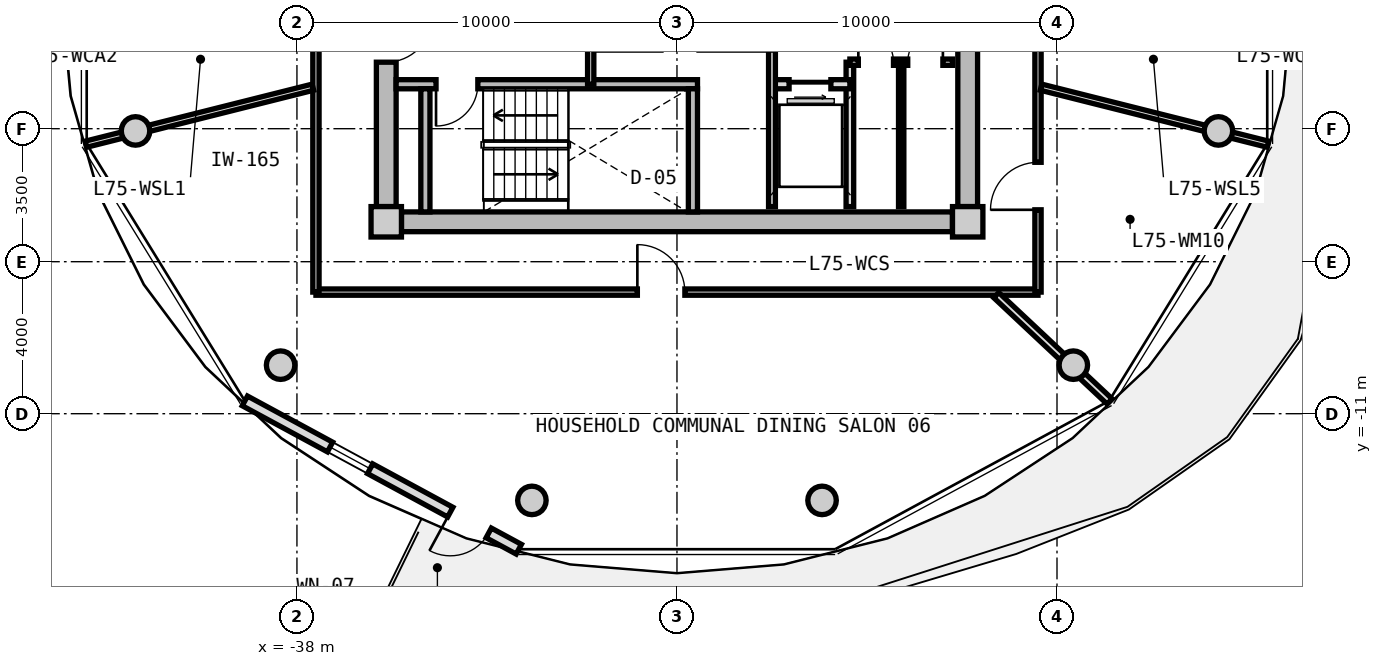
"""IFC4 building model, lengths in metres.
Left out: names, types, materials, properties, quantities, classifications, styles, units other than length and angle.
Written with IfcOpenShell. Run it as: python <this file> out.ifc"""

import sys

from ifc_helpers import new_model, si_unit, direction, frame, frame_2d, origin, origin_2d, place, context, subcontext, project, spatial, rectangle, circle, extrude, source, transform, mapped, element, fill, save


model = new_model("IFC4")
c1 = context("Model", 3, precision=1e-05, world=origin(), true_north=direction((0.0, 1.0)))
c2 = subcontext(c1, "Body", "Model", "MODEL_VIEW")
j1 = project(units=[si_unit("LENGTHUNIT", "METRE"), si_unit("PLANEANGLEUNIT", "RADIAN")], contexts=[c1])
p1 = place(None, origin())
s1 = spatial("IfcSite", under=j1, at=p1, CompositionType="ELEMENT")
p2 = place(p1, origin())
s2 = spatial("IfcBuilding", under=s1, at=p2, CompositionType="ELEMENT")
p3 = place(p2, frame((0.0, 0.0, 241.35)))
s3 = spatial("IfcBuildingStorey", under=s2, at=p3, CompositionType="ELEMENT", Elevation=241.35)
m1 = source(origin(), c2, "Body", "SweptSolid", [
    extrude(rectangle(XDim=0.8, YDim=0.8, at=origin_2d()), origin(), (0.0, 0.0, 1.0), 3.05),
])
for number, where, z_axis, x_axis in (
    (1, (-35.65, -5.95, 0.0), (0.0, 0.0, 1.0), (1.0, 0.0, 0.0)),
    (2, (-20.35, -5.95, 0.0), (0.0, 0.0, 1.0), (1.0, 0.0, 0.0)),
):
    element("IfcColumn", number, at=place(p3, frame(where, z_axis=z_axis, x_axis=x_axis)), inside=s3, PredefinedType="COLUMN", context=c2, shape_type="MappedRepresentation", body=[
        mapped(m1, transform((0.0, 0.0, 0.0), x_axis=(1.0, 0.0, 0.0), y_axis=(0.0, 1.0, 0.0), z_axis=(0.0, 0.0, 1.0), scale=1.0)),
    ])
m2 = source(origin(), c2, "Body", "SweptSolid", [
    extrude(rectangle(XDim=14.5, YDim=0.52, at=frame_2d((7.25, 0.0))), origin(), (0.0, 0.0, 1.0), 2.73),
])
p4 = place(p3, frame((-20.75, -5.95, 0.0), z_axis=(0.0, 0.0, 1.0), x_axis=(-1.0, 0.0, 0.0)))
e3 = element("IfcWall", 3, at=p4, inside=s3, PredefinedType="SHEAR", context=c2, shape_type="MappedRepresentation", body=[
    mapped(m2, transform((0.0, 0.0, 0.0), x_axis=(1.0, 0.0, 0.0), y_axis=(0.0, 1.0, 0.0), z_axis=(0.0, 0.0, 1.0), scale=1.0)),
])
m3 = source(origin(), c2, "Body", "SweptSolid", [
    extrude(rectangle(XDim=11.1, YDim=0.52, at=frame_2d((5.55, 0.0))), origin(), (0.0, 0.0, 1.0), 2.73),
])
p5 = place(p3, frame((-35.65, -5.55, 0.0), z_axis=(0.0, 0.0, 1.0), x_axis=(0.0, 1.0, 0.0)))
e4 = element("IfcWall", 4, at=p5, inside=s3, PredefinedType="SHEAR", context=c2, shape_type="MappedRepresentation", body=[
    mapped(m3, transform((0.0, 0.0, 0.0), x_axis=(1.0, 0.0, 0.0), y_axis=(0.0, 1.0, 0.0), z_axis=(0.0, 0.0, 1.0), scale=1.0)),
])
p6 = place(p5, frame((3.8, 0.0, 0.0)))
e5 = element("IfcOpeningElement", 5, at=p6, cuts=e4, PredefinedType="OPENING", context=c2, shape_type="SweptSolid", body=[
    extrude(rectangle(XDim=1.2, YDim=2.15, at=frame_2d((0.6, 1.075))), frame((0.0, 0.27, 0.0), z_axis=(0.0, -1.0, 0.0), x_axis=(1.0, 0.0, 0.0)), (0.0, 0.0, 1.0), 0.54),
])
p7 = place(p3, frame((-20.35, 5.55, 0.0), z_axis=(0.0, 0.0, 1.0), x_axis=(0.0, -1.0, 0.0)))
e6 = element("IfcWall", 6, at=p7, inside=s3, PredefinedType="SHEAR", context=c2, shape_type="MappedRepresentation", body=[
    mapped(m3, transform((0.0, 0.0, 0.0), x_axis=(1.0, 0.0, 0.0), y_axis=(0.0, 1.0, 0.0), z_axis=(0.0, 0.0, 1.0), scale=1.0)),
])
p8 = place(p7, frame((5.65, 0.0, 0.0)))
e7 = element("IfcOpeningElement", 7, at=p8, cuts=e6, PredefinedType="OPENING", context=c2, shape_type="SweptSolid", body=[
    extrude(rectangle(XDim=1.2, YDim=2.15, at=frame_2d((0.6, 1.075))), frame((0.0, 0.27, 0.0), z_axis=(0.0, -1.0, 0.0), x_axis=(1.0, 0.0, 0.0)), (0.0, 0.0, 1.0), 0.54),
])
m4 = source(origin(), c2, "Body", "SweptSolid", [
    extrude(circle(Radius=0.375, at=origin_2d()), origin(), (0.0, 0.0, 1.0), 3.05),
])
for number, where, z_axis, x_axis in (
    (8, (-42.247, -3.559, 0.0), (0.0, 0.0, 1.0), (1.0, 0.0, 0.0)),
    (9, (-38.43, -9.723, 0.0), (0.0, 0.0, 1.0), (1.0, 0.0, 0.0)),
    (10, (-31.818, -13.281, 0.0), (0.0, 0.0, 1.0), (1.0, 0.0, 0.0)),
    (11, (-24.182, -13.281, 0.0), (0.0, 0.0, 1.0), (1.0, 0.0, 0.0)),
    (12, (-17.57, -9.723, 0.0), (0.0, 0.0, 1.0), (1.0, 0.0, 0.0)),
    (13, (-13.753, -3.559, 0.0), (0.0, 0.0, 1.0), (1.0, 0.0, 0.0)),
):
    element("IfcColumn", number, at=place(p3, frame(where, z_axis=z_axis, x_axis=x_axis)), inside=s3, PredefinedType="COLUMN", context=c2, shape_type="MappedRepresentation", body=[
        mapped(m4, transform((0.0, 0.0, 0.0), x_axis=(1.0, 0.0, 0.0), y_axis=(0.0, 1.0, 0.0), z_axis=(0.0, 0.0, 1.0), scale=1.0)),
    ])
m5 = source(origin(), c2, "Body", "SweptSolid", [
    extrude(rectangle(XDim=8.197, YDim=0.29, at=frame_2d((4.099, 0.0))), origin(), (0.0, 0.0, 1.0), 2.73),
])
p9 = place(p3, frame((-32.162, -14.566, 0.0), z_axis=(0.0, 0.0, 1.0), x_axis=(-0.879369910001, 0.476139224791, 0.0)))
e14 = element("IfcWall", 14, at=p9, inside=s3, PredefinedType="SOLIDWALL", context=c2, shape_type="MappedRepresentation", body=[
    mapped(m5, transform((0.0, 0.0, 0.0), x_axis=(1.0, 0.0, 0.0), y_axis=(0.0, 1.0, 0.0), z_axis=(0.0, 0.0, 1.0), scale=1.0)),
])
p10 = place(p9, frame((0.9, 0.0, 0.0)))
e15 = element("IfcOpeningElement", 15, at=p10, cuts=e14, PredefinedType="OPENING", context=c2, shape_type="SweptSolid", body=[
    extrude(rectangle(XDim=1.15, YDim=2.25, at=frame_2d((0.575, 1.125))), frame((0.0, 0.155, 0.0), z_axis=(0.0, -1.0, 0.0), x_axis=(1.0, 0.0, 0.0)), (0.0, 0.0, 1.0), 0.31),
])
p11 = place(p9, frame((4.448, 0.0, 0.85)))
e16 = element("IfcOpeningElement", 16, at=p11, cuts=e14, PredefinedType="OPENING", context=c2, shape_type="SweptSolid", body=[
    extrude(rectangle(XDim=1.2, YDim=1.5, at=frame_2d((0.6, 0.75))), frame((0.0, 0.155, 0.0), z_axis=(0.0, -1.0, 0.0), x_axis=(1.0, 0.0, 0.0)), (0.0, 0.0, 1.0), 0.31),
])
m6 = source(origin(), c2, "Body", "SweptSolid", [
    extrude(rectangle(XDim=7.93, YDim=0.24, at=frame_2d((3.965, 0.0))), origin(), (0.0, 0.0, 1.0), 2.73),
])
p12 = place(p3, frame((-35.39, -2.33, 0.0), z_axis=(0.0, 0.0, 1.0), x_axis=(1.0, 0.0, 0.0)))
e17 = element("IfcWall", 17, at=p12, inside=s3, PredefinedType="PARTITIONING", context=c2, shape_type="MappedRepresentation", body=[
    mapped(m6, transform((0.0, 0.0, 0.0), x_axis=(1.0, 0.0, 0.0), y_axis=(0.0, 1.0, 0.0), z_axis=(0.0, 0.0, 1.0), scale=1.0)),
])
p13 = place(p12, frame((1.05, 0.0, 0.0)))
e18 = element("IfcOpeningElement", 18, at=p13, cuts=e17, PredefinedType="OPENING", context=c2, shape_type="SweptSolid", body=[
    extrude(rectangle(XDim=1.1, YDim=2.15, at=frame_2d((0.55, 1.075))), frame((0.0, 0.13, 0.0), z_axis=(0.0, -1.0, 0.0), x_axis=(1.0, 0.0, 0.0)), (0.0, 0.0, 1.0), 0.26),
])
m7 = source(origin(), c2, "Body", "SweptSolid", [
    extrude(rectangle(XDim=3.24, YDim=0.24, at=frame_2d((1.62, 0.0))), origin(), (0.0, 0.0, 1.0), 2.73),
])
for number, where, z_axis, x_axis in (
    (19, (-34.62, -5.69, 0.0), (0.0, 0.0, 1.0), (0.0, 1.0, 0.0)),
    (20, (-27.58, -5.69, 0.0), (0.0, 0.0, 1.0), (0.0, 1.0, 0.0)),
):
    element("IfcWall", number, at=place(p3, frame(where, z_axis=z_axis, x_axis=x_axis)), inside=s3, PredefinedType="PARTITIONING", context=c2, shape_type="MappedRepresentation", body=[
        mapped(m7, transform((0.0, 0.0, 0.0), x_axis=(1.0, 0.0, 0.0), y_axis=(0.0, 1.0, 0.0), z_axis=(0.0, 0.0, 1.0), scale=1.0)),
    ])
m8 = source(origin(), c2, "Body", "SweptSolid", [
    extrude(rectangle(XDim=3.8, YDim=0.2, at=frame_2d((1.9, 0.0))), origin(), (0.0, 0.0, 1.0), 2.715),
])
p14 = place(p3, frame((-23.45, -5.55, 0.0), z_axis=(0.0, 0.0, 1.0), x_axis=(0.0, 1.0, 0.0)))
e21 = element("IfcWall", 21, at=p14, inside=s3, PredefinedType="PARTITIONING", context=c2, shape_type="MappedRepresentation", body=[
    mapped(m8, transform((0.0, 0.0, 0.0), x_axis=(1.0, 0.0, 0.0), y_axis=(0.0, 1.0, 0.0), z_axis=(0.0, 0.0, 1.0), scale=1.0)),
])
m9 = source(origin(), c2, "Body", "SweptSolid", [
    extrude(rectangle(XDim=2.05, YDim=0.24, at=frame_2d((1.025, 0.0))), origin(), (0.0, 0.0, 1.0), 2.715),
])
p15 = place(p3, frame((-25.5, -2.33, 0.0), z_axis=(0.0, 0.0, 1.0), x_axis=(1.0, 0.0, 0.0)))
e22 = element("IfcWall", 22, at=p15, inside=s3, PredefinedType="PARTITIONING", context=c2, shape_type="MappedRepresentation", body=[
    mapped(m9, transform((0.0, 0.0, 0.0), x_axis=(1.0, 0.0, 0.0), y_axis=(0.0, 1.0, 0.0), z_axis=(0.0, 0.0, 1.0), scale=1.0)),
])
p16 = place(p15, frame((0.45, 0.0, 0.0)))
e23 = element("IfcOpeningElement", 23, at=p16, cuts=e22, PredefinedType="OPENING", context=c2, shape_type="SweptSolid", body=[
    extrude(rectangle(XDim=1.1, YDim=2.2, at=frame_2d((0.55, 1.1))), frame((0.0, 0.13, 0.0), z_axis=(0.0, -1.0, 0.0), x_axis=(1.0, 0.0, 0.0)), (0.0, 0.0, 1.0), 0.26),
])
m10 = source(origin(), c2, "Body", "SweptSolid", [
    extrude(rectangle(XDim=4.2, YDim=0.18, at=frame_2d((2.1, 0.0))), origin(), (0.0, 0.0, 1.0), 2.715),
])
p17 = place(p3, frame((-25.5, -5.55, 0.0), z_axis=(0.0, 0.0, 1.0), x_axis=(0.0, 1.0, 0.0)))
e24 = element("IfcWall", 24, at=p17, inside=s3, PredefinedType="PARTITIONING", context=c2, shape_type="MappedRepresentation", body=[
    mapped(m10, transform((0.0, 0.0, 0.0), x_axis=(1.0, 0.0, 0.0), y_axis=(0.0, 1.0, 0.0), z_axis=(0.0, 0.0, 1.0), scale=1.0)),
])
m11 = source(origin(), c2, "Body", "SweptSolid", [
    extrude(rectangle(XDim=0.98, YDim=0.165, at=frame_2d((0.49, 0.0))), origin(), (0.0, 0.0, 1.0), 2.715),
])
p18 = place(p3, frame((-30.27, -2.33, 0.0), z_axis=(0.0, 0.0, 1.0), x_axis=(0.0, 1.0, 0.0)))
e25 = element("IfcWall", 25, at=p18, inside=s3, PredefinedType="PARTITIONING", context=c2, shape_type="MappedRepresentation", body=[
    mapped(m11, transform((0.0, 0.0, 0.0), x_axis=(1.0, 0.0, 0.0), y_axis=(0.0, 1.0, 0.0), z_axis=(0.0, 0.0, 1.0), scale=1.0)),
])
m12 = source(origin(), c2, "Body", "SweptSolid", [
    extrude(rectangle(XDim=2.7, YDim=0.165, at=frame_2d((1.35, 0.0))), origin(), (0.0, 0.0, 1.0), 2.715),
])
p19 = place(p3, frame((-23.45, -1.75, 0.0), z_axis=(0.0, 0.0, 1.0), x_axis=(1.0, 0.0, 0.0)))
e26 = element("IfcWall", 26, at=p19, inside=s3, PredefinedType="PARTITIONING", context=c2, shape_type="MappedRepresentation", body=[
    mapped(m12, transform((0.0, 0.0, 0.0), x_axis=(1.0, 0.0, 0.0), y_axis=(0.0, 1.0, 0.0), z_axis=(0.0, 0.0, 1.0), scale=1.0)),
])
p20 = place(p19, frame((0.222, 0.0, 0.0)))
e27 = element("IfcOpeningElement", 27, at=p20, cuts=e26, PredefinedType="OPENING", context=c2, shape_type="SweptSolid", body=[
    extrude(rectangle(XDim=0.925, YDim=2.1, at=frame_2d((0.462, 1.05))), frame((0.0, 0.093, 0.0), z_axis=(0.0, -1.0, 0.0), x_axis=(1.0, 0.0, 0.0)), (0.0, 0.0, 1.0), 0.185),
])
p21 = place(p19, frame((1.522, 0.0, 0.0)))
e28 = element("IfcOpeningElement", 28, at=p21, cuts=e26, PredefinedType="OPENING", context=c2, shape_type="SweptSolid", body=[
    extrude(rectangle(XDim=0.925, YDim=2.1, at=frame_2d((0.462, 1.05))), frame((0.0, 0.093, 0.0), z_axis=(0.0, -1.0, 0.0), x_axis=(1.0, 0.0, 0.0)), (0.0, 0.0, 1.0), 0.185),
])
m13 = source(origin(), c2, "Body", "SweptSolid", [
    extrude(rectangle(XDim=3.8, YDim=0.14, at=frame_2d((1.9, 0.0))), origin(), (0.0, 0.0, 1.0), 2.715),
])
p22 = place(p3, frame((-22.1, -5.55, 0.0), z_axis=(0.0, 0.0, 1.0), x_axis=(0.0, 1.0, 0.0)))
e29 = element("IfcWall", 29, at=p22, inside=s3, PredefinedType="PARTITIONING", context=c2, shape_type="MappedRepresentation", body=[
    mapped(m13, transform((0.0, 0.0, 0.0), x_axis=(1.0, 0.0, 0.0), y_axis=(0.0, 1.0, 0.0), z_axis=(0.0, 0.0, 1.0), scale=1.0)),
])
m14 = source(origin(), c2, "Body", "SweptSolid", [
    extrude(rectangle(XDim=19.0, YDim=0.165, at=frame_2d((9.5, 0.0))), origin(), (0.0, 0.0, 1.0), 2.715),
])
p23 = place(p3, frame((-18.5, -7.8, 0.0), z_axis=(0.0, 0.0, 1.0), x_axis=(-1.0, 0.0, 0.0)))
e30 = element("IfcWall", 30, at=p23, inside=s3, PredefinedType="PARTITIONING", context=c2, shape_type="MappedRepresentation", body=[
    mapped(m14, transform((0.0, 0.0, 0.0), x_axis=(1.0, 0.0, 0.0), y_axis=(0.0, 1.0, 0.0), z_axis=(0.0, 0.0, 1.0), scale=1.0)),
])
p24 = place(p23, frame((9.292, 0.0, 0.0)))
e31 = element("IfcOpeningElement", 31, at=p24, cuts=e30, PredefinedType="OPENING", context=c2, shape_type="SweptSolid", body=[
    extrude(rectangle(XDim=1.25, YDim=2.2, at=frame_2d((0.625, 1.1))), frame((0.0, 0.093, 0.0), z_axis=(0.0, -1.0, 0.0), x_axis=(1.0, 0.0, 0.0)), (0.0, 0.0, 1.0), 0.185),
])
m15 = source(origin(), c2, "Body", "SweptSolid", [
    extrude(rectangle(XDim=6.88, YDim=0.165, at=frame_2d((3.44, 0.0))), origin(), (0.0, 0.0, 1.0), 2.715),
])
p25 = place(p3, frame((-37.5, -7.8, 0.0), z_axis=(0.0, 0.0, 1.0), x_axis=(0.0, 1.0, 0.0)))
e32 = element("IfcWall", 32, at=p25, inside=s3, PredefinedType="PARTITIONING", context=c2, shape_type="MappedRepresentation", body=[
    mapped(m15, transform((0.0, 0.0, 0.0), x_axis=(1.0, 0.0, 0.0), y_axis=(0.0, 1.0, 0.0), z_axis=(0.0, 0.0, 1.0), scale=1.0)),
])
p26 = place(p3, frame((-18.5, -0.92, 0.0), z_axis=(0.0, 0.0, 1.0), x_axis=(0.0, -1.0, 0.0)))
e33 = element("IfcWall", 33, at=p26, inside=s3, PredefinedType="PARTITIONING", context=c2, shape_type="MappedRepresentation", body=[
    mapped(m15, transform((0.0, 0.0, 0.0), x_axis=(1.0, 0.0, 0.0), y_axis=(0.0, 1.0, 0.0), z_axis=(0.0, 0.0, 1.0), scale=1.0)),
])
p27 = place(p26, frame((3.464, 0.0, 0.0)))
e34 = element("IfcOpeningElement", 34, at=p27, cuts=e33, PredefinedType="OPENING", context=c2, shape_type="SweptSolid", body=[
    extrude(rectangle(XDim=1.25, YDim=2.2, at=frame_2d((0.625, 1.1))), frame((0.0, 0.093, 0.0), z_axis=(0.0, -1.0, 0.0), x_axis=(1.0, 0.0, 0.0)), (0.0, 0.0, 1.0), 0.185),
])
m16 = source(origin(), c2, "Body", "SweptSolid", [
    extrude(rectangle(XDim=6.157, YDim=0.165, at=frame_2d((3.079, 0.0))), origin(), (0.0, 0.0, 1.0), 2.315),
])
for number, where, z_axis, x_axis in (
    (35, (-37.58, -2.407, 0.0), (0.0, 0.0, 1.0), (-0.97, -0.244, 0.0)),
    (36, (-18.42, -2.407, 0.0), (0.0, 0.0, 1.0), (0.97, -0.244, 0.0)),
):
    element("IfcWall", number, at=place(p3, frame(where, z_axis=z_axis, x_axis=x_axis)), inside=s3, PredefinedType="PARTITIONING", context=c2, shape_type="MappedRepresentation", body=[
        mapped(m16, transform((0.0, 0.0, 0.0), x_axis=(1.0, 0.0, 0.0), y_axis=(0.0, 1.0, 0.0), z_axis=(0.0, 0.0, 1.0), scale=1.0)),
    ])
m17 = source(origin(), c2, "Body", "SweptSolid", [
    extrude(rectangle(XDim=4.089, YDim=0.19, at=frame_2d((2.044, 0.0))), origin(), (0.0, 0.0, 1.0), 2.315),
])
p28 = place(p3, frame((-19.598, -7.88, 0.0), z_axis=(0.0, 0.0, 1.0), x_axis=(0.729401273609, -0.684086092577, 0.0)))
e37 = element("IfcWall", 37, at=p28, inside=s3, PredefinedType="PARTITIONING", context=c2, shape_type="MappedRepresentation", body=[
    mapped(m17, transform((0.0, 0.0, 0.0), x_axis=(1.0, 0.0, 0.0), y_axis=(0.0, 1.0, 0.0), z_axis=(0.0, 0.0, 1.0), scale=1.0)),
])
m18 = source(origin(), c2, "Body", "SweptSolid", [
    extrude(rectangle(XDim=1.15, YDim=2.25, at=frame_2d((0.575, 1.125))), frame((0.0, 0.025, 0.0), z_axis=(0.0, -1.0, 0.0), x_axis=(1.0, 0.0, 0.0)), (0.0, 0.0, 1.0), 0.05),
])
p29 = place(p10, origin())
e38 = element("IfcDoor", 38, at=p29, inside=s3, OperationType="SINGLE_SWING_RIGHT", PredefinedType="DOOR", context=c2, shape_type="MappedRepresentation", body=[
    mapped(m18, transform((0.0, 0.0, 0.0), x_axis=(1.0, 0.0, 0.0), y_axis=(0.0, 1.0, 0.0), z_axis=(0.0, 0.0, 1.0), scale=1.0)),
])
fill(e15, e38)
m19 = source(origin(), c2, "Body", "SweptSolid", [
    extrude(rectangle(XDim=1.2, YDim=1.5, at=frame_2d((0.6, 0.75))), frame((0.0, 0.03, 0.0), z_axis=(0.0, -1.0, 0.0), x_axis=(1.0, 0.0, 0.0)), (0.0, 0.0, 1.0), 0.06),
])
p30 = place(p11, origin())
e39 = element("IfcWindow", 39, at=p30, inside=s3, PartitioningType="SINGLE_PANEL", PredefinedType="WINDOW", context=c2, shape_type="MappedRepresentation", body=[
    mapped(m19, transform((0.0, 0.0, 0.0), x_axis=(1.0, 0.0, 0.0), y_axis=(0.0, 1.0, 0.0), z_axis=(0.0, 0.0, 1.0), scale=1.0)),
])
fill(e16, e39)
m20 = source(origin(), c2, "Body", "SweptSolid", [
    extrude(rectangle(XDim=1.1, YDim=2.15, at=frame_2d((0.55, 1.075))), frame((0.0, 0.025, 0.0), z_axis=(0.0, -1.0, 0.0), x_axis=(1.0, 0.0, 0.0)), (0.0, 0.0, 1.0), 0.05),
])
p31 = place(p13, frame((1.1, 0.0, 0.0), z_axis=(0.0, 0.0, 1.0), x_axis=(-1.0, 0.0, 0.0)))
e40 = element("IfcDoor", 40, at=p31, inside=s3, OperationType="SINGLE_SWING_RIGHT", PredefinedType="DOOR", context=c2, shape_type="MappedRepresentation", body=[
    mapped(m20, transform((0.0, 0.0, 0.0), x_axis=(1.0, 0.0, 0.0), y_axis=(0.0, 1.0, 0.0), z_axis=(0.0, 0.0, 1.0), scale=1.0)),
])
fill(e18, e40)
m21 = source(origin(), c2, "Body", "SweptSolid", [
    extrude(rectangle(XDim=1.2, YDim=2.15, at=frame_2d((0.6, 1.075))), frame((0.0, 0.025, 0.0), z_axis=(0.0, -1.0, 0.0), x_axis=(1.0, 0.0, 0.0)), (0.0, 0.0, 1.0), 0.05),
])
p32 = place(p6, frame((1.2, 0.0, 0.0), z_axis=(0.0, 0.0, 1.0), x_axis=(-1.0, 0.0, 0.0)))
e41 = element("IfcDoor", 41, at=p32, inside=s3, OperationType="SINGLE_SWING_LEFT", PredefinedType="DOOR", context=c2, shape_type="MappedRepresentation", body=[
    mapped(m21, transform((0.0, 0.0, 0.0), x_axis=(1.0, 0.0, 0.0), y_axis=(0.0, 1.0, 0.0), z_axis=(0.0, 0.0, 1.0), scale=1.0)),
])
fill(e5, e41)
m22 = source(origin(), c2, "Body", "SweptSolid", [
    extrude(rectangle(XDim=1.1, YDim=2.2, at=frame_2d((0.55, 1.1))), frame((0.0, 0.025, 0.0), z_axis=(0.0, -1.0, 0.0), x_axis=(1.0, 0.0, 0.0)), (0.0, 0.0, 1.0), 0.05),
])
p33 = place(p16, frame((1.1, 0.0, 0.0), z_axis=(0.0, 0.0, 1.0), x_axis=(-1.0, 0.0, 0.0)))
e42 = element("IfcDoor", 42, at=p33, inside=s3, OperationType="SLIDING_TO_RIGHT", PredefinedType="DOOR", context=c2, shape_type="MappedRepresentation", body=[
    mapped(m22, transform((0.0, 0.0, 0.0), x_axis=(1.0, 0.0, 0.0), y_axis=(0.0, 1.0, 0.0), z_axis=(0.0, 0.0, 1.0), scale=1.0)),
])
fill(e23, e42)
m23 = source(origin(), c2, "Body", "SweptSolid", [
    extrude(rectangle(XDim=0.925, YDim=2.1, at=frame_2d((0.462, 1.05))), frame((0.0, 0.025, 0.0), z_axis=(0.0, -1.0, 0.0), x_axis=(1.0, 0.0, 0.0)), (0.0, 0.0, 1.0), 0.05),
])
p34 = place(p20, origin())
e43 = element("IfcDoor", 43, at=p34, inside=s3, OperationType="SINGLE_SWING_LEFT", PredefinedType="DOOR", context=c2, shape_type="MappedRepresentation", body=[
    mapped(m23, transform((0.0, 0.0, 0.0), x_axis=(1.0, 0.0, 0.0), y_axis=(0.0, 1.0, 0.0), z_axis=(0.0, 0.0, 1.0), scale=1.0)),
])
fill(e27, e43)
p35 = place(p21, origin())
e44 = element("IfcDoor", 44, at=p35, inside=s3, OperationType="SINGLE_SWING_RIGHT", PredefinedType="DOOR", context=c2, shape_type="MappedRepresentation", body=[
    mapped(m23, transform((0.0, 0.0, 0.0), x_axis=(1.0, 0.0, 0.0), y_axis=(0.0, 1.0, 0.0), z_axis=(0.0, 0.0, 1.0), scale=1.0)),
])
fill(e28, e44)
m24 = source(origin(), c2, "Body", "SweptSolid", [
    extrude(rectangle(XDim=1.25, YDim=2.2, at=frame_2d((0.625, 1.1))), frame((0.0, 0.025, 0.0), z_axis=(0.0, -1.0, 0.0), x_axis=(1.0, 0.0, 0.0)), (0.0, 0.0, 1.0), 0.05),
])
p36 = place(p24, frame((1.25, 0.0, 0.0), z_axis=(0.0, 0.0, 1.0), x_axis=(-1.0, 0.0, 0.0)))
e45 = element("IfcDoor", 45, at=p36, inside=s3, OperationType="SINGLE_SWING_LEFT", PredefinedType="DOOR", context=c2, shape_type="MappedRepresentation", body=[
    mapped(m24, transform((0.0, 0.0, 0.0), x_axis=(1.0, 0.0, 0.0), y_axis=(0.0, 1.0, 0.0), z_axis=(0.0, 0.0, 1.0), scale=1.0)),
])
fill(e31, e45)
p37 = place(p27, frame((1.25, 0.0, 0.0), z_axis=(0.0, 0.0, 1.0), x_axis=(-1.0, 0.0, 0.0)))
e46 = element("IfcDoor", 46, at=p37, inside=s3, OperationType="SINGLE_SWING_LEFT", PredefinedType="DOOR", context=c2, shape_type="MappedRepresentation", body=[
    mapped(m24, transform((0.0, 0.0, 0.0), x_axis=(1.0, 0.0, 0.0), y_axis=(0.0, 1.0, 0.0), z_axis=(0.0, 0.0, 1.0), scale=1.0)),
])
fill(e34, e46)
save(model, sys.argv[1])
